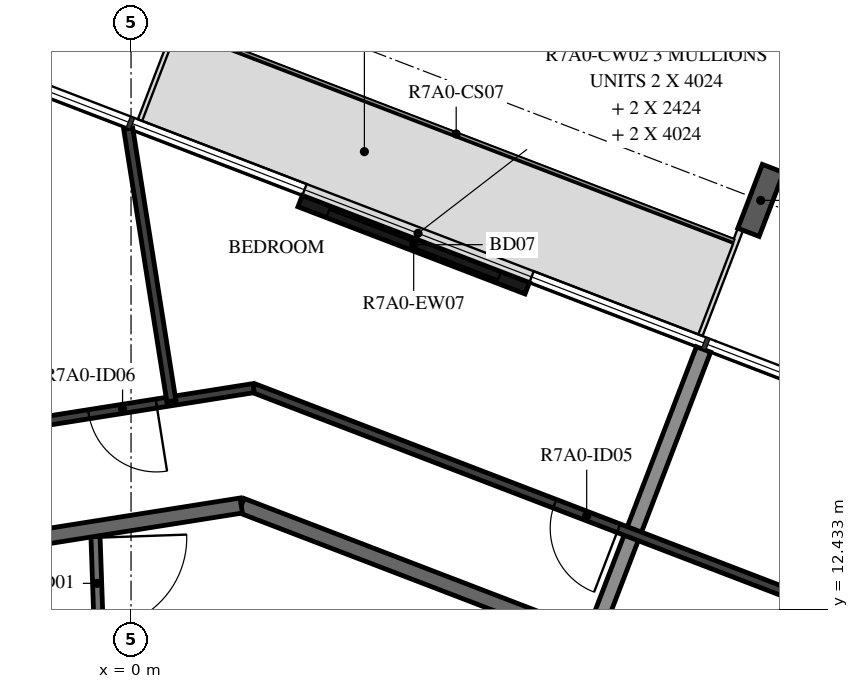
"""IFC4 building model, lengths in metres.
Left out: names, types, materials, properties, quantities, classifications, styles, units other than length and angle.
Written with IfcOpenShell. Run it as: python <this file> out.ifc"""

import sys

from ifc_helpers import new_model, si_unit, direction, frame, frame_2d, origin, origin_2d, place, context, subcontext, project, spatial, rectangle, i_section, extrude, element, fill, save


model = new_model("IFC4")
c1 = context("Model", 3, precision=1e-05, world=origin(), true_north=direction((0.0, 1.0)))
c2 = subcontext(c1, "Body", "Model", "MODEL_VIEW")
j1 = project(units=[si_unit("LENGTHUNIT", "METRE"), si_unit("PLANEANGLEUNIT", "RADIAN")], contexts=[c1])
p1 = place(None, origin())
s1 = spatial("IfcSite", under=j1, at=p1, CompositionType="ELEMENT")
p2 = place(p1, origin())
s2 = spatial("IfcBuilding", under=s1, at=p2, CompositionType="ELEMENT")
p3 = place(p2, frame((0.0, 0.0, 270.4)))
s3 = spatial("IfcBuildingStorey", under=s2, at=p3, CompositionType="ELEMENT", Elevation=270.4)
p4 = place(p3, frame((8.284, 17.811, -0.38), z_axis=(0.0, 0.0, 1.0), x_axis=(0.933580354843, -0.35836813621, 0.0)))
e1 = element("IfcColumn", 1, at=p4, inside=s3, PredefinedType="COLUMN", context=c2, shape_type="SweptSolid", body=[
    extrude(i_section(OverallWidth=0.3, OverallDepth=0.9, WebThickness=0.019, FlangeThickness=0.035, FilletRadius=0.03, at=origin_2d()), origin(), (0.0, 0.0, 1.0), 3.5),
])
p5 = place(p3, frame((5.212, 16.655, 0.0), z_axis=(0.0, 0.0, 1.0), x_axis=(-0.933579413923, 0.358370587381, 0.0)))
e2 = element("IfcWall", 2, at=p5, inside=s3, PredefinedType="STANDARD", context=c2, shape_type="SweptSolid", body=[
    extrude(rectangle(XDim=3.2, YDim=0.16, at=frame_2d((1.6, 0.0))), origin(), (0.0, 0.0, 1.0), 3.12),
])
p6 = place(p5, frame((0.4, 0.0, 0.0)))
e3 = element("IfcOpeningElement", 3, at=p6, cuts=e2, PredefinedType="OPENING", context=c2, shape_type="SweptSolid", body=[
    extrude(rectangle(XDim=2.4, YDim=2.4, at=frame_2d((1.2, 1.2))), frame((0.0, 0.09, 0.0), z_axis=(0.0, -1.0, 0.0), x_axis=(1.0, 0.0, 0.0)), (0.0, 0.0, 1.0), 0.18),
])
p7 = place(p3, frame((-0.471, 13.492, 0.0), z_axis=(0.0, 0.0, 1.0), x_axis=(0.034873173869, -0.999391745886, 0.0)))
e4 = element("IfcWall", 4, at=p7, inside=s3, PredefinedType="PARTITIONING", context=c2, shape_type="SweptSolid", body=[
    extrude(rectangle(XDim=1.596, YDim=0.12, at=frame_2d((0.798, 0.0))), origin(), (0.0, 0.0, 1.0), 3.12),
])
p8 = place(p7, frame((0.12, 0.0, 0.0)))
e5 = element("IfcOpeningElement", 5, at=p8, cuts=e4, PredefinedType="OPENING", context=c2, shape_type="SweptSolid", body=[
    extrude(rectangle(XDim=1.2, YDim=2.1, at=frame_2d((0.6, 1.05))), frame((0.0, 0.07, 0.0), z_axis=(0.0, -1.0, 0.0), x_axis=(1.0, 0.0, 0.0)), (0.0, 0.0, 1.0), 0.14),
])
p9 = place(p3, frame((8.154, 11.223, 0.0), z_axis=(0.0, 0.0, 1.0), x_axis=(-0.93359073609, 0.358341090983, 0.0)))
e6 = element("IfcWall", 6, at=p9, inside=s3, PredefinedType="STANDARD", context=c2, shape_type="SweptSolid", body=[
    extrude(rectangle(XDim=7.181, YDim=0.2, at=frame_2d((3.59, 0.0))), origin(), (0.0, 0.0, 1.0), 3.12),
])
p10 = place(p3, frame((1.45, 13.797, 0.0), z_axis=(0.0, 0.0, 1.0), x_axis=(-0.987690361611, -0.156421704315, 0.0)))
e7 = element("IfcWall", 7, at=p10, inside=s3, PredefinedType="STANDARD", context=c2, shape_type="SweptSolid", body=[
    extrude(rectangle(XDim=7.181, YDim=0.2, at=frame_2d((3.591, 0.0))), origin(), (0.0, 0.0, 1.0), 3.12),
])
p11 = place(p3, frame((7.532, 15.85, 0.0), z_axis=(0.0, 0.0, 1.0), x_axis=(-0.358355996975, -0.933585014571, 0.0)))
e8 = element("IfcWall", 8, at=p11, inside=s3, PredefinedType="STANDARD", context=c2, shape_type="SweptSolid", body=[
    extrude(rectangle(XDim=4.096, YDim=0.2, at=frame_2d((2.048, 0.0))), origin(), (0.0, 0.0, 1.0), 2.73),
])
p12 = place(p3, frame((9.067, 12.479, 0.0), z_axis=(0.0, 0.0, 1.0), x_axis=(-0.933579449035, 0.358370495911, 0.0)))
e9 = element("IfcWall", 9, at=p12, inside=s3, PredefinedType="PARTITIONING", context=c2, shape_type="SweptSolid", body=[
    extrude(rectangle(XDim=7.985, YDim=0.12, at=frame_2d((3.992, 0.0))), origin(), (0.0, 0.0, 1.0), 3.12),
])
p13 = place(p12, frame((2.841, 0.0, 0.0)))
e10 = element("IfcOpeningElement", 10, at=p13, cuts=e9, PredefinedType="OPENING", context=c2, shape_type="SweptSolid", body=[
    extrude(rectangle(XDim=0.9, YDim=2.1, at=frame_2d((0.45, 1.05))), frame((0.0, 0.07, 0.0), z_axis=(0.0, -1.0, 0.0), x_axis=(1.0, 0.0, 0.0)), (0.0, 0.0, 1.0), 0.14),
])
p14 = place(p3, frame((1.612, 15.341, 0.0), z_axis=(0.0, 0.0, 1.0), x_axis=(-0.987689722749, -0.156425738216, 0.0)))
e11 = element("IfcWall", 11, at=p14, inside=s3, PredefinedType="PARTITIONING", context=c2, shape_type="SweptSolid", body=[
    extrude(rectangle(XDim=7.985, YDim=0.12, at=frame_2d((3.992, 0.0))), origin(), (0.0, 0.0, 1.0), 3.12),
])
p15 = place(p14, frame((1.295, 0.0, 0.0)))
e12 = element("IfcOpeningElement", 12, at=p15, cuts=e11, PredefinedType="OPENING", context=c2, shape_type="SweptSolid", body=[
    extrude(rectangle(XDim=0.9, YDim=2.1, at=frame_2d((0.45, 1.05))), frame((0.0, 0.07, 0.0), z_axis=(0.0, -1.0, 0.0), x_axis=(1.0, 0.0, 0.0)), (0.0, 0.0, 1.0), 0.14),
])
p16 = place(p14, frame((5.107, 0.0, 0.0)))
e13 = element("IfcOpeningElement", 13, at=p16, cuts=e11, PredefinedType="OPENING", context=c2, shape_type="SweptSolid", body=[
    extrude(rectangle(XDim=0.9, YDim=2.1, at=frame_2d((0.45, 1.05))), frame((0.0, 0.07, 0.0), z_axis=(0.0, -1.0, 0.0), x_axis=(1.0, 0.0, 0.0)), (0.0, 0.0, 1.0), 0.14),
])
p17 = place(p3, frame((-0.037, 18.756, 0.0), z_axis=(0.0, 0.0, 1.0), x_axis=(0.156421851095, -0.987690338365, 0.0)))
e14 = element("IfcWall", 14, at=p17, inside=s3, PredefinedType="PARTITIONING", context=c2, shape_type="SweptSolid", body=[
    extrude(rectangle(XDim=3.63, YDim=0.12, at=frame_2d((1.815, 0.0))), origin(), (0.0, 0.0, 1.0), 3.12),
])
p18 = place(p6, origin())
e15 = element("IfcDoor", 15, at=p18, inside=s3, OperationType="DOUBLE_DOOR_SLIDING", PredefinedType="DOOR", context=c2, shape_type="SweptSolid", body=[
    extrude(rectangle(XDim=2.4, YDim=2.4, at=frame_2d((1.2, 1.2))), frame((0.0, 0.025, 0.0), z_axis=(0.0, -1.0, 0.0), x_axis=(1.0, 0.0, 0.0)), (0.0, 0.0, 1.0), 0.05),
])
fill(e3, e15)
p19 = place(p13, origin())
e16 = element("IfcDoor", 16, at=p19, inside=s3, OperationType="SINGLE_SWING_LEFT", PredefinedType="DOOR", context=c2, shape_type="SweptSolid", body=[
    extrude(rectangle(XDim=0.9, YDim=2.1, at=frame_2d((0.45, 1.05))), frame((0.0, 0.025, 0.0), z_axis=(0.0, -1.0, 0.0), x_axis=(1.0, 0.0, 0.0)), (0.0, 0.0, 1.0), 0.05),
])
fill(e10, e16)
p20 = place(p15, origin())
e17 = element("IfcDoor", 17, at=p20, inside=s3, OperationType="SINGLE_SWING_RIGHT", PredefinedType="DOOR", context=c2, shape_type="SweptSolid", body=[
    extrude(rectangle(XDim=0.9, YDim=2.1, at=frame_2d((0.45, 1.05))), frame((0.0, 0.025, 0.0), z_axis=(0.0, -1.0, 0.0), x_axis=(1.0, 0.0, 0.0)), (0.0, 0.0, 1.0), 0.05),
])
fill(e12, e17)
p21 = place(p8, origin())
e18 = element("IfcDoor", 18, at=p21, inside=s3, OperationType="DOUBLE_DOOR_SINGLE_SWING", PredefinedType="DOOR", context=c2, shape_type="SweptSolid", body=[
    extrude(rectangle(XDim=1.2, YDim=2.1, at=frame_2d((0.6, 1.05))), frame((0.0, 0.025, 0.0), z_axis=(0.0, -1.0, 0.0), x_axis=(1.0, 0.0, 0.0)), (0.0, 0.0, 1.0), 0.05),
])
fill(e5, e18)
save(model, sys.argv[1])
